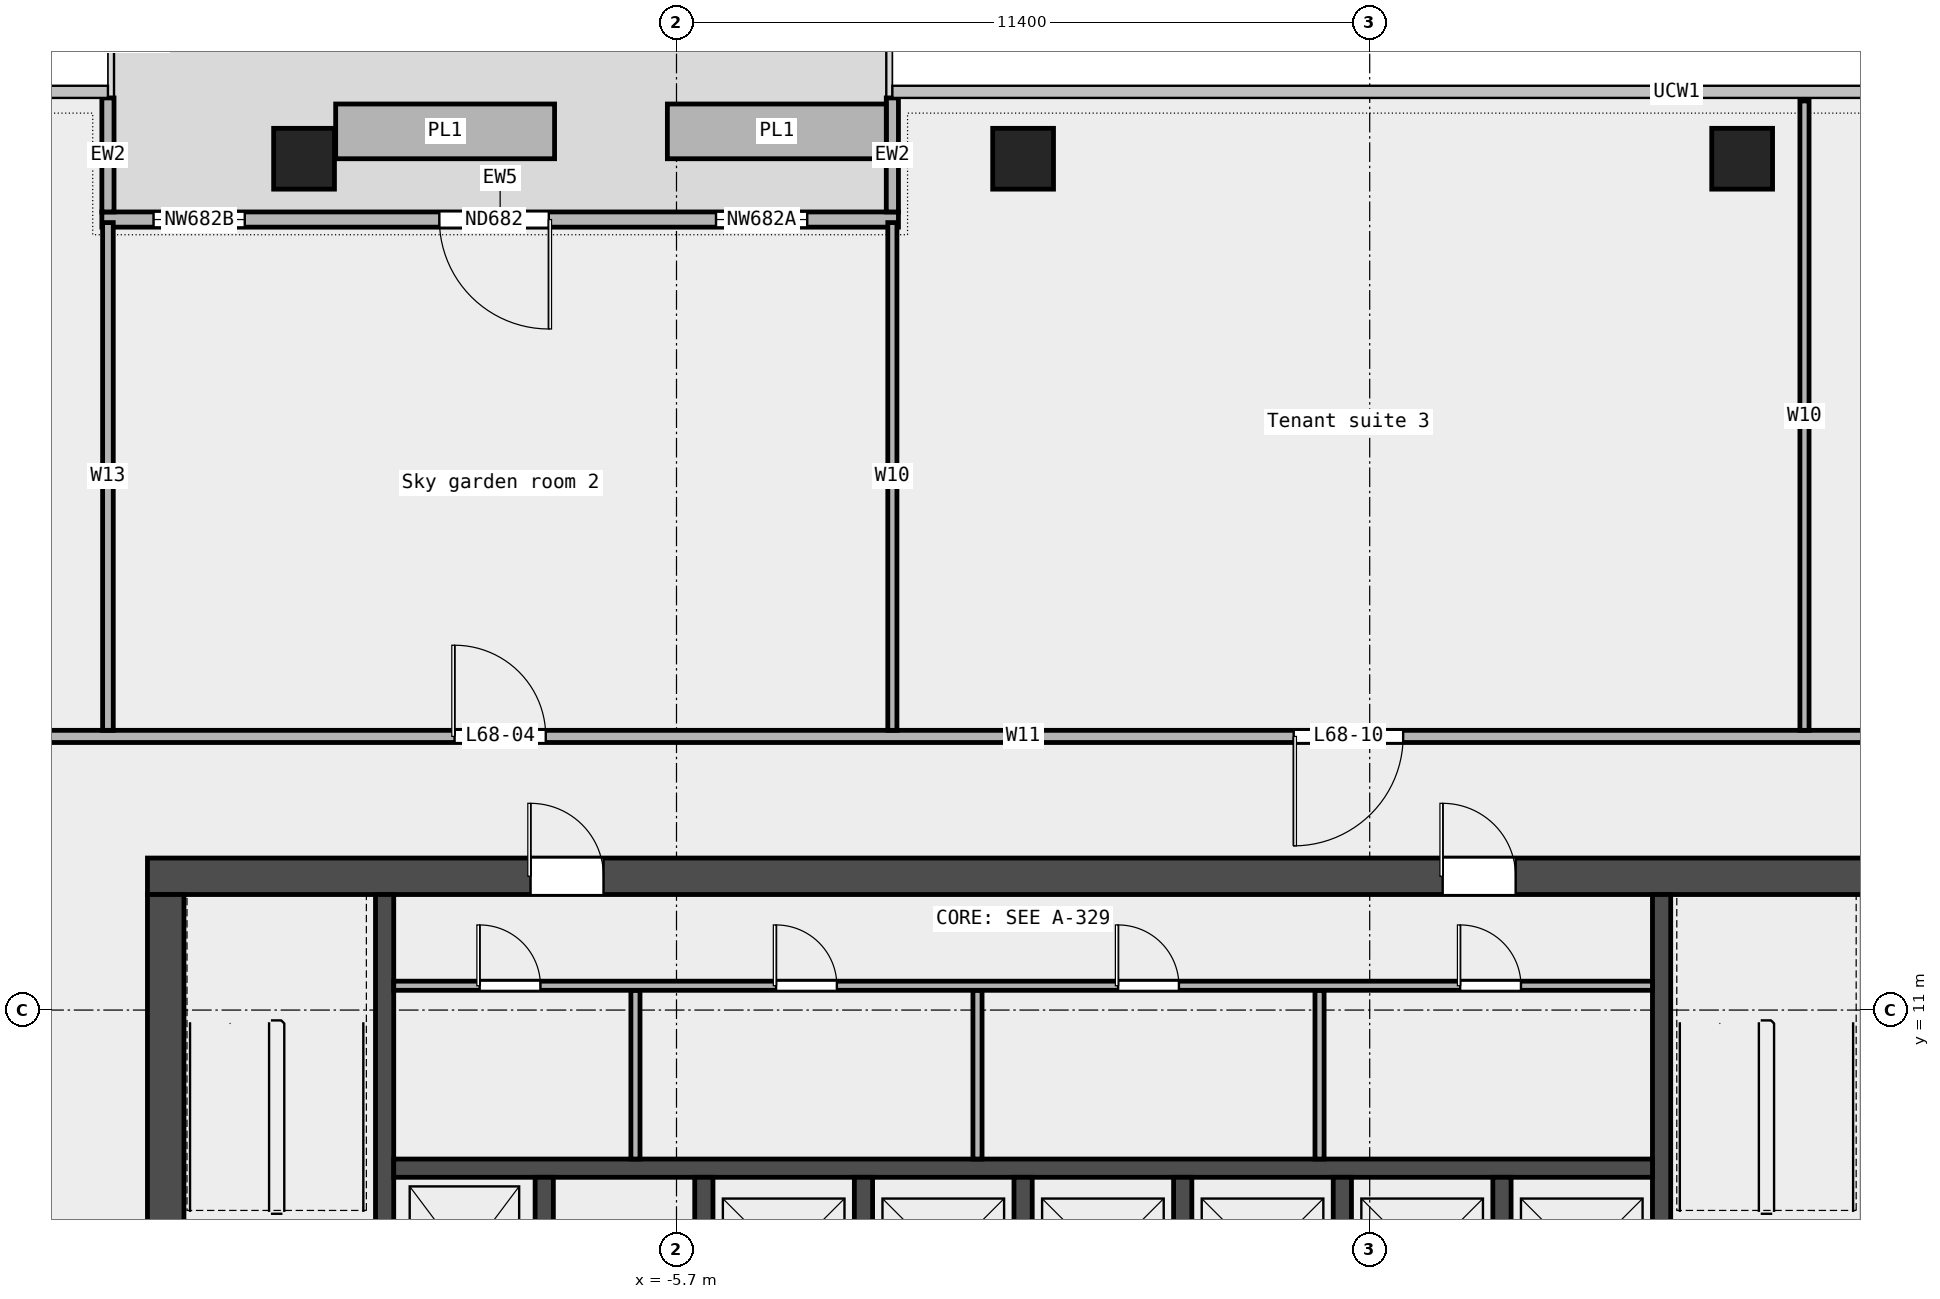
"""IFC4 building model, lengths in metres.
Left out: names, types, materials, properties, quantities, classifications, styles, units other than length and angle.
Written with IfcOpenShell. Run it as: python <this file> out.ifc"""

import sys

from ifc_helpers import new_model, si_unit, direction, frame, frame_2d, origin, origin_2d, place, context, subcontext, project, spatial, rectangle, extrude, element, fill, save


model = new_model("IFC4")
c1 = context("Model", 3, precision=1e-05, world=origin(), true_north=direction((0.0, 1.0)))
c2 = subcontext(c1, "Body", "Model", "MODEL_VIEW")
j1 = project(units=[si_unit("LENGTHUNIT", "METRE"), si_unit("PLANEANGLEUNIT", "RADIAN")], contexts=[c1])
p1 = place(None, origin())
s1 = spatial("IfcSite", under=j1, at=p1, CompositionType="ELEMENT")
p2 = place(p1, origin())
s2 = spatial("IfcBuilding", under=s1, at=p2, CompositionType="ELEMENT")
p3 = place(p2, frame((0.0, 0.0, 311.4)))
s3 = spatial("IfcBuildingStorey", under=s2, at=p3, CompositionType="ELEMENT", Elevation=311.4)
for number, where, z_axis, x_axis in (
    (1, (11.825, 25.0, 0.0), (0.0, 0.0, 1.0), (1.0, 0.0, 0.0)),
    (2, (0.0, 25.0, 0.0), (0.0, 0.0, 1.0), (1.0, 0.0, 0.0)),
    (3, (-11.825, 25.0, 0.0), (0.0, 0.0, 1.0), (1.0, 0.0, 0.0)),
):
    element("IfcColumn", number, at=place(p3, frame(where, z_axis=z_axis, x_axis=x_axis)), inside=s3, PredefinedType="COLUMN", context=c2, shape_type="SweptSolid", body=[
        extrude(rectangle(XDim=1.0, YDim=1.0, at=origin_2d()), origin(), (0.0, 0.0, 1.0), 3.4),
    ])
p4 = place(p3, frame((-2.05, 24.0, 0.0), z_axis=(0.0, 0.0, 1.0), x_axis=(-1.0, 0.0, 0.0)))
e4 = element("IfcWall", 4, at=p4, inside=s3, PredefinedType="STANDARD", context=c2, shape_type="SweptSolid", body=[
    extrude(rectangle(XDim=13.1, YDim=0.25, at=frame_2d((6.55, 0.0))), origin(), (0.0, 0.0, 1.0), 3.4),
])
p5 = place(p4, frame((1.5, 0.0, 0.45)))
e5 = element("IfcOpeningElement", 5, at=p5, cuts=e4, PredefinedType="OPENING", context=c2, shape_type="SweptSolid", body=[
    extrude(rectangle(XDim=1.5, YDim=2.4, at=frame_2d((0.75, 1.2))), frame((0.0, 0.137, 0.0), z_axis=(0.0, -1.0, 0.0), x_axis=(1.0, 0.0, 0.0)), (0.0, 0.0, 1.0), 0.274),
])
p6 = place(p4, frame((5.75, 0.0, 0.0)))
e6 = element("IfcOpeningElement", 6, at=p6, cuts=e4, PredefinedType="OPENING", context=c2, shape_type="SweptSolid", body=[
    extrude(rectangle(XDim=1.8, YDim=2.4, at=frame_2d((0.9, 1.2))), frame((0.0, 0.137, 0.0), z_axis=(0.0, -1.0, 0.0), x_axis=(1.0, 0.0, 0.0)), (0.0, 0.0, 1.0), 0.274),
])
p7 = place(p4, frame((10.75, 0.0, 0.45)))
e7 = element("IfcOpeningElement", 7, at=p7, cuts=e4, PredefinedType="OPENING", context=c2, shape_type="SweptSolid", body=[
    extrude(rectangle(XDim=1.5, YDim=2.4, at=frame_2d((0.75, 1.2))), frame((0.0, 0.137, 0.0), z_axis=(0.0, -1.0, 0.0), x_axis=(1.0, 0.0, 0.0)), (0.0, 0.0, 1.0), 0.274),
])
for number, where, z_axis, x_axis in (
    (8, (-2.15, 26.0, 0.0), (0.0, 0.0, 1.0), (0.0, -1.0, 0.0)),
    (9, (-15.05, 26.0, 0.0), (0.0, 0.0, 1.0), (0.0, -1.0, 0.0)),
):
    element("IfcWall", number, at=place(p3, frame(where, z_axis=z_axis, x_axis=x_axis)), inside=s3, PredefinedType="STANDARD", context=c2, shape_type="SweptSolid", body=[
        extrude(rectangle(XDim=1.875, YDim=0.2, at=frame_2d((0.938, 0.0))), origin(), (0.0, 0.0, 1.0), 3.4),
    ])
for number, where, z_axis, x_axis in (
    (10, (-2.25, 25.45, 0.0), (0.0, 0.0, 1.0), (-1.0, 0.0, 0.0)),
    (11, (-7.705, 25.45, 0.0), (0.0, 0.0, 1.0), (-1.0, 0.0, 0.0)),
):
    element("IfcWall", number, at=place(p3, frame(where, z_axis=z_axis, x_axis=x_axis)), inside=s3, PredefinedType="STANDARD", context=c2, shape_type="SweptSolid", body=[
        extrude(rectangle(XDim=3.6, YDim=0.9, at=frame_2d((1.8, 0.0))), origin(), (0.0, 0.0, 1.0), 0.7),
    ])
p8 = place(p3, frame((-29.6, 15.5, 0.0), z_axis=(0.0, 0.0, 1.0), x_axis=(1.0, 0.0, 0.0)))
e12 = element("IfcWall", 12, at=p8, inside=s3, PredefinedType="PARTITIONING", context=c2, shape_type="SweptSolid", body=[
    extrude(rectangle(XDim=59.2, YDim=0.2, at=frame_2d((29.6, 0.0))), origin(), (0.0, 0.0, 1.0), 3.4),
])
p9 = place(p8, frame((20.25, 0.0, 0.0)))
e13 = element("IfcOpeningElement", 13, at=p9, cuts=e12, PredefinedType="OPENING", context=c2, shape_type="SweptSolid", body=[
    extrude(rectangle(XDim=1.5, YDim=2.1, at=frame_2d((0.75, 1.05))), frame((0.0, 0.112, 0.0), z_axis=(0.0, -1.0, 0.0), x_axis=(1.0, 0.0, 0.0)), (0.0, 0.0, 1.0), 0.224),
])
p10 = place(p8, frame((49.825, 0.0, 0.0)))
e14 = element("IfcOpeningElement", 14, at=p10, cuts=e12, PredefinedType="OPENING", context=c2, shape_type="SweptSolid", body=[
    extrude(rectangle(XDim=1.8, YDim=2.1, at=frame_2d((0.9, 1.05))), frame((0.0, 0.112, 0.0), z_axis=(0.0, -1.0, 0.0), x_axis=(1.0, 0.0, 0.0)), (0.0, 0.0, 1.0), 0.224),
])
p11 = place(p8, frame((34.05, 0.0, 0.0)))
e15 = element("IfcOpeningElement", 15, at=p11, cuts=e12, PredefinedType="OPENING", context=c2, shape_type="SweptSolid", body=[
    extrude(rectangle(XDim=1.8, YDim=2.1, at=frame_2d((0.9, 1.05))), frame((0.0, 0.112, 0.0), z_axis=(0.0, -1.0, 0.0), x_axis=(1.0, 0.0, 0.0)), (0.0, 0.0, 1.0), 0.224),
])
p12 = place(p8, frame((6.625, 0.0, 0.0)))
e16 = element("IfcOpeningElement", 16, at=p12, cuts=e12, PredefinedType="OPENING", context=c2, shape_type="SweptSolid", body=[
    extrude(rectangle(XDim=1.5, YDim=2.1, at=frame_2d((0.75, 1.05))), frame((0.0, 0.112, 0.0), z_axis=(0.0, -1.0, 0.0), x_axis=(1.0, 0.0, 0.0)), (0.0, 0.0, 1.0), 0.224),
])
p13 = place(p3, frame((-15.05, 15.6, 0.0), z_axis=(0.0, 0.0, 1.0), x_axis=(0.0, 1.0, 0.0)))
e17 = element("IfcWall", 17, at=p13, inside=s3, PredefinedType="PARTITIONING", context=c2, shape_type="SweptSolid", body=[
    extrude(rectangle(XDim=8.35, YDim=0.175, at=frame_2d((4.175, 0.0))), origin(), (0.0, 0.0, 1.0), 3.4),
])
p14 = place(p3, frame((-2.15, 15.6, 0.0), z_axis=(0.0, 0.0, 1.0), x_axis=(0.0, 1.0, 0.0)))
e18 = element("IfcWall", 18, at=p14, inside=s3, PredefinedType="PARTITIONING", context=c2, shape_type="SweptSolid", body=[
    extrude(rectangle(XDim=8.35, YDim=0.15, at=frame_2d((4.175, 0.0))), origin(), (0.0, 0.0, 1.0), 3.4),
])
p15 = place(p3, frame((12.85, 15.6, 0.0), z_axis=(0.0, 0.0, 1.0), x_axis=(0.0, 1.0, 0.0)))
e19 = element("IfcWall", 19, at=p15, inside=s3, PredefinedType="PARTITIONING", context=c2, shape_type="SweptSolid", body=[
    extrude(rectangle(XDim=10.35, YDim=0.15, at=frame_2d((5.175, 0.0))), origin(), (0.0, 0.0, 1.0), 3.4),
])
p16 = place(p3, frame((-14.4, 13.2, 0.0), z_axis=(0.0, 0.0, 1.0), x_axis=(1.0, 0.0, 0.0)))
e20 = element("IfcWall", 20, at=p16, inside=s3, PredefinedType="SHEAR", context=c2, shape_type="SweptSolid", body=[
    extrude(rectangle(XDim=28.8, YDim=0.6, at=frame_2d((14.4, 0.0))), origin(), (0.0, 0.0, 1.0), 3.7),
])
p17 = place(p16, frame((6.3, 0.0, 0.0)))
e21 = element("IfcOpeningElement", 21, at=p17, cuts=e20, PredefinedType="OPENING", context=c2, shape_type="SweptSolid", body=[
    extrude(rectangle(XDim=1.2, YDim=2.1, at=frame_2d((0.6, 1.05))), frame((0.0, 0.312, 0.0), z_axis=(0.0, -1.0, 0.0), x_axis=(1.0, 0.0, 0.0)), (0.0, 0.0, 1.0), 0.624),
])
p18 = place(p16, frame((21.3, 0.0, 0.0)))
e22 = element("IfcOpeningElement", 22, at=p18, cuts=e20, PredefinedType="OPENING", context=c2, shape_type="SweptSolid", body=[
    extrude(rectangle(XDim=1.2, YDim=2.1, at=frame_2d((0.6, 1.05))), frame((0.0, 0.312, 0.0), z_axis=(0.0, -1.0, 0.0), x_axis=(1.0, 0.0, 0.0)), (0.0, 0.0, 1.0), 0.624),
])
p19 = place(p3, frame((-14.1, -6.6, 0.0), z_axis=(0.0, 0.0, 1.0), x_axis=(0.0, 1.0, 0.0)))
e23 = element("IfcWall", 23, at=p19, inside=s3, PredefinedType="SHEAR", context=c2, shape_type="SweptSolid", body=[
    extrude(rectangle(XDim=19.5, YDim=0.6, at=frame_2d((9.75, 0.0))), origin(), (0.0, 0.0, 1.0), 3.7),
])
p20 = place(p19, frame((9.3, 0.0, 0.0)))
e24 = element("IfcOpeningElement", 24, at=p20, cuts=e23, PredefinedType="OPENING", context=c2, shape_type="SweptSolid", body=[
    extrude(rectangle(XDim=1.8, YDim=2.1, at=frame_2d((0.9, 1.05))), frame((0.0, 0.312, 0.0), z_axis=(0.0, -1.0, 0.0), x_axis=(1.0, 0.0, 0.0)), (0.0, 0.0, 1.0), 0.624),
])
for number, where, z_axis, x_axis in (
    (25, (-10.5, 5.25, 0.0), (0.0, 0.0, 1.0), (0.0, 1.0, 0.0)),
    (26, (10.5, 5.25, 0.0), (0.0, 0.0, 1.0), (0.0, 1.0, 0.0)),
):
    element("IfcWall", number, at=place(p3, frame(where, z_axis=z_axis, x_axis=x_axis)), inside=s3, PredefinedType="SHEAR", context=c2, shape_type="SweptSolid", body=[
        extrude(rectangle(XDim=7.65, YDim=0.3, at=frame_2d((3.825, 0.0))), origin(), (0.0, 0.0, 1.0), 3.7),
    ])
p21 = place(p3, frame((-10.35, 8.4, 0.0), z_axis=(0.0, 0.0, 1.0), x_axis=(1.0, 0.0, 0.0)))
e27 = element("IfcWall", 27, at=p21, inside=s3, PredefinedType="SOLIDWALL", context=c2, shape_type="SweptSolid", body=[
    extrude(rectangle(XDim=20.7, YDim=0.3, at=frame_2d((10.35, 0.0))), origin(), (0.0, 0.0, 1.0), 3.7),
])
for number, where, z_axis, x_axis in (
    (28, (-7.875, 5.55, 0.0), (0.0, 0.0, 1.0), (0.0, 1.0, 0.0)),
    (29, (-5.25, 5.55, 0.0), (0.0, 0.0, 1.0), (0.0, 1.0, 0.0)),
    (30, (-2.625, 5.55, 0.0), (0.0, 0.0, 1.0), (0.0, 1.0, 0.0)),
    (31, (0.0, 5.55, 0.0), (0.0, 0.0, 1.0), (0.0, 1.0, 0.0)),
    (32, (2.625, 5.55, 0.0), (0.0, 0.0, 1.0), (0.0, 1.0, 0.0)),
    (33, (5.25, 5.55, 0.0), (0.0, 0.0, 1.0), (0.0, 1.0, 0.0)),
    (34, (7.875, 5.55, 0.0), (0.0, 0.0, 1.0), (0.0, 1.0, 0.0)),
):
    element("IfcWall", number, at=place(p3, frame(where, z_axis=z_axis, x_axis=x_axis)), inside=s3, PredefinedType="SOLIDWALL", context=c2, shape_type="SweptSolid", body=[
        extrude(rectangle(XDim=2.7, YDim=0.3, at=frame_2d((1.35, 0.0))), origin(), (0.0, 0.0, 1.0), 3.7),
    ])
for number, where, z_axis, x_axis in (
    (35, (-6.375, 8.55, 0.0), (0.0, 0.0, 1.0), (0.0, 1.0, 0.0)),
    (36, (-0.75, 8.55, 0.0), (0.0, 0.0, 1.0), (0.0, 1.0, 0.0)),
    (37, (4.875, 8.55, 0.0), (0.0, 0.0, 1.0), (0.0, 1.0, 0.0)),
):
    element("IfcWall", number, at=place(p3, frame(where, z_axis=z_axis, x_axis=x_axis)), inside=s3, PredefinedType="PARTITIONING", context=c2, shape_type="SweptSolid", body=[
        extrude(rectangle(XDim=2.775, YDim=0.15, at=frame_2d((1.387, 0.0))), origin(), (0.0, 0.0, 1.0), 3.7),
    ])
p22 = place(p3, frame((-10.35, 11.4, 0.0), z_axis=(0.0, 0.0, 1.0), x_axis=(1.0, 0.0, 0.0)))
e38 = element("IfcWall", 38, at=p22, inside=s3, PredefinedType="PARTITIONING", context=c2, shape_type="SweptSolid", body=[
    extrude(rectangle(XDim=20.7, YDim=0.15, at=frame_2d((10.35, 0.0))), origin(), (0.0, 0.0, 1.0), 3.7),
])
p23 = place(p22, frame((1.413, 0.0, 0.0)))
e39 = element("IfcOpeningElement", 39, at=p23, cuts=e38, PredefinedType="OPENING", context=c2, shape_type="SweptSolid", body=[
    extrude(rectangle(XDim=1.0, YDim=2.1, at=frame_2d((0.5, 1.05))), frame((0.0, 0.087, 0.0), z_axis=(0.0, -1.0, 0.0), x_axis=(1.0, 0.0, 0.0)), (0.0, 0.0, 1.0), 0.174),
])
p24 = place(p22, frame((6.288, 0.0, 0.0)))
e40 = element("IfcOpeningElement", 40, at=p24, cuts=e38, PredefinedType="OPENING", context=c2, shape_type="SweptSolid", body=[
    extrude(rectangle(XDim=1.0, YDim=2.1, at=frame_2d((0.5, 1.05))), frame((0.0, 0.087, 0.0), z_axis=(0.0, -1.0, 0.0), x_axis=(1.0, 0.0, 0.0)), (0.0, 0.0, 1.0), 0.174),
])
p25 = place(p22, frame((11.913, 0.0, 0.0)))
e41 = element("IfcOpeningElement", 41, at=p25, cuts=e38, PredefinedType="OPENING", context=c2, shape_type="SweptSolid", body=[
    extrude(rectangle(XDim=1.0, YDim=2.1, at=frame_2d((0.5, 1.05))), frame((0.0, 0.087, 0.0), z_axis=(0.0, -1.0, 0.0), x_axis=(1.0, 0.0, 0.0)), (0.0, 0.0, 1.0), 0.174),
])
p26 = place(p22, frame((17.538, 0.0, 0.0)))
e42 = element("IfcOpeningElement", 42, at=p26, cuts=e38, PredefinedType="OPENING", context=c2, shape_type="SweptSolid", body=[
    extrude(rectangle(XDim=1.0, YDim=2.1, at=frame_2d((0.5, 1.05))), frame((0.0, 0.087, 0.0), z_axis=(0.0, -1.0, 0.0), x_axis=(1.0, 0.0, 0.0)), (0.0, 0.0, 1.0), 0.174),
])
p27 = place(p5, origin())
e43 = element("IfcWindow", 43, at=p27, inside=s3, PartitioningType="SINGLE_PANEL", PredefinedType="WINDOW", context=c2, shape_type="SweptSolid", body=[
    extrude(rectangle(XDim=1.5, YDim=2.4, at=frame_2d((0.75, 1.2))), frame((0.0, 0.03, 0.0), z_axis=(0.0, -1.0, 0.0), x_axis=(1.0, 0.0, 0.0)), (0.0, 0.0, 1.0), 0.06),
])
fill(e5, e43)
p28 = place(p6, origin())
e44 = element("IfcDoor", 44, at=p28, inside=s3, OperationType="DOUBLE_DOOR_SINGLE_SWING", PredefinedType="DOOR", context=c2, shape_type="SweptSolid", body=[
    extrude(rectangle(XDim=1.8, YDim=2.4, at=frame_2d((0.9, 1.2))), frame((0.0, 0.025, 0.0), z_axis=(0.0, -1.0, 0.0), x_axis=(1.0, 0.0, 0.0)), (0.0, 0.0, 1.0), 0.05),
])
fill(e6, e44)
p29 = place(p7, origin())
e45 = element("IfcWindow", 45, at=p29, inside=s3, PartitioningType="SINGLE_PANEL", PredefinedType="WINDOW", context=c2, shape_type="SweptSolid", body=[
    extrude(rectangle(XDim=1.5, YDim=2.4, at=frame_2d((0.75, 1.2))), frame((0.0, 0.03, 0.0), z_axis=(0.0, -1.0, 0.0), x_axis=(1.0, 0.0, 0.0)), (0.0, 0.0, 1.0), 0.06),
])
fill(e7, e45)
p30 = place(p9, origin())
e46 = element("IfcDoor", 46, at=p30, inside=s3, OperationType="DOUBLE_DOOR_SINGLE_SWING", PredefinedType="DOOR", context=c2, shape_type="SweptSolid", body=[
    extrude(rectangle(XDim=1.5, YDim=2.1, at=frame_2d((0.75, 1.05))), frame((0.0, 0.025, 0.0), z_axis=(0.0, -1.0, 0.0), x_axis=(1.0, 0.0, 0.0)), (0.0, 0.0, 1.0), 0.05),
])
fill(e13, e46)
p31 = place(p11, origin())
e47 = element("IfcDoor", 47, at=p31, inside=s3, OperationType="DOUBLE_DOOR_SINGLE_SWING", PredefinedType="DOOR", context=c2, shape_type="SweptSolid", body=[
    extrude(rectangle(XDim=1.8, YDim=2.1, at=frame_2d((0.9, 1.05))), frame((0.0, 0.025, 0.0), z_axis=(0.0, -1.0, 0.0), x_axis=(1.0, 0.0, 0.0)), (0.0, 0.0, 1.0), 0.05),
])
fill(e15, e47)
p32 = place(p23, origin())
e48 = element("IfcDoor", 48, at=p32, inside=s3, OperationType="SINGLE_SWING_LEFT", PredefinedType="DOOR", context=c2, shape_type="SweptSolid", body=[
    extrude(rectangle(XDim=1.0, YDim=2.1, at=frame_2d((0.5, 1.05))), frame((0.0, 0.025, 0.0), z_axis=(0.0, -1.0, 0.0), x_axis=(1.0, 0.0, 0.0)), (0.0, 0.0, 1.0), 0.05),
])
fill(e39, e48)
p33 = place(p24, origin())
e49 = element("IfcDoor", 49, at=p33, inside=s3, OperationType="SINGLE_SWING_LEFT", PredefinedType="DOOR", context=c2, shape_type="SweptSolid", body=[
    extrude(rectangle(XDim=1.0, YDim=2.1, at=frame_2d((0.5, 1.05))), frame((0.0, 0.025, 0.0), z_axis=(0.0, -1.0, 0.0), x_axis=(1.0, 0.0, 0.0)), (0.0, 0.0, 1.0), 0.05),
])
fill(e40, e49)
p34 = place(p25, origin())
e50 = element("IfcDoor", 50, at=p34, inside=s3, OperationType="SINGLE_SWING_LEFT", PredefinedType="DOOR", context=c2, shape_type="SweptSolid", body=[
    extrude(rectangle(XDim=1.0, YDim=2.1, at=frame_2d((0.5, 1.05))), frame((0.0, 0.025, 0.0), z_axis=(0.0, -1.0, 0.0), x_axis=(1.0, 0.0, 0.0)), (0.0, 0.0, 1.0), 0.05),
])
fill(e41, e50)
p35 = place(p26, origin())
e51 = element("IfcDoor", 51, at=p35, inside=s3, OperationType="SINGLE_SWING_LEFT", PredefinedType="DOOR", context=c2, shape_type="SweptSolid", body=[
    extrude(rectangle(XDim=1.0, YDim=2.1, at=frame_2d((0.5, 1.05))), frame((0.0, 0.025, 0.0), z_axis=(0.0, -1.0, 0.0), x_axis=(1.0, 0.0, 0.0)), (0.0, 0.0, 1.0), 0.05),
])
fill(e42, e51)
p36 = place(p17, origin())
e52 = element("IfcDoor", 52, at=p36, inside=s3, OperationType="SINGLE_SWING_LEFT", PredefinedType="DOOR", context=c2, shape_type="SweptSolid", body=[
    extrude(rectangle(XDim=1.2, YDim=2.1, at=frame_2d((0.6, 1.05))), frame((0.0, 0.025, 0.0), z_axis=(0.0, -1.0, 0.0), x_axis=(1.0, 0.0, 0.0)), (0.0, 0.0, 1.0), 0.05),
])
fill(e21, e52)
p37 = place(p18, origin())
e53 = element("IfcDoor", 53, at=p37, inside=s3, OperationType="SINGLE_SWING_RIGHT", PredefinedType="DOOR", context=c2, shape_type="SweptSolid", body=[
    extrude(rectangle(XDim=1.2, YDim=2.1, at=frame_2d((0.6, 1.05))), frame((0.0, 0.025, 0.0), z_axis=(0.0, -1.0, 0.0), x_axis=(1.0, 0.0, 0.0)), (0.0, 0.0, 1.0), 0.05),
])
fill(e22, e53)
save(model, sys.argv[1])
